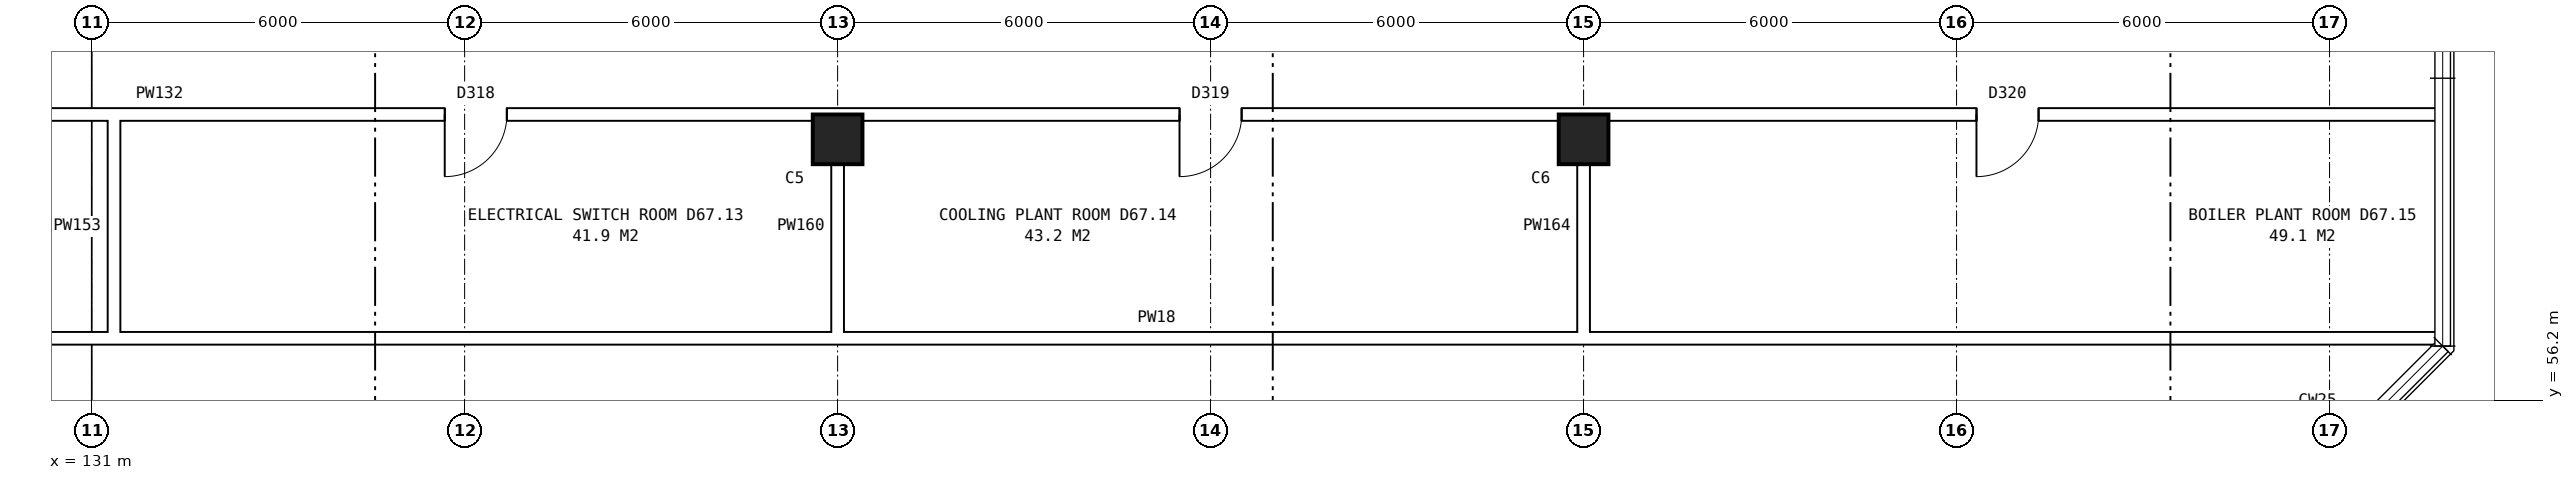
"""IFC4 building model, lengths in metres.
Left out: names, types, materials, properties, quantities, classifications, styles, units other than length and angle.
Written with IfcOpenShell. Run it as: python <this file> out.ifc"""

import sys

from ifc_helpers import new_model, si_unit, direction, frame, frame_2d, origin, origin_2d, place, context, subcontext, project, spatial, rectangle, extrude, element, fill, save


model = new_model("IFC4")
c1 = context("Model", 3, precision=1e-05, world=origin(), true_north=direction((0.0, 1.0)))
c2 = subcontext(c1, "Body", "Model", "MODEL_VIEW")
j1 = project(units=[si_unit("LENGTHUNIT", "METRE"), si_unit("PLANEANGLEUNIT", "RADIAN")], contexts=[c1])
p1 = place(None, origin())
s1 = spatial("IfcSite", under=j1, at=p1, CompositionType="ELEMENT")
p2 = place(p1, origin())
s2 = spatial("IfcBuilding", under=s1, at=p2, CompositionType="ELEMENT")
p3 = place(p2, frame((0.0, 0.0, 236.9)))
s3 = spatial("IfcBuildingStorey", under=s2, at=p3, CompositionType="ELEMENT", Elevation=236.9)
for number, where, z_axis, x_axis in (
    (1, (143.0, 60.4, 0.0), (0.0, 0.0, 1.0), (1.0, 0.0, 0.0)),
    (2, (155.0, 60.4, 0.0), (0.0, 0.0, 1.0), (1.0, 0.0, 0.0)),
):
    element("IfcColumn", number, at=place(p3, frame(where, z_axis=z_axis, x_axis=x_axis)), inside=s3, PredefinedType="COLUMN", context=c2, shape_type="SweptSolid", body=[
        extrude(rectangle(XDim=0.8, YDim=0.8, at=origin_2d()), origin(), (0.0, 0.0, 1.0), 6.7),
    ])
p4 = place(p3, frame((46.66, 57.2, 0.0), z_axis=(0.0, 0.0, 1.0), x_axis=(1.0, 0.0, 0.0)))
e3 = element("IfcWall", 3, at=p4, inside=s3, PredefinedType="PARTITIONING", context=c2, shape_type="SweptSolid", body=[
    extrude(rectangle(XDim=122.1, YDim=0.2, at=frame_2d((61.05, 0.0))), origin(), (0.0, 0.0, 1.0), 6.7),
])
p5 = place(p3, frame((46.66, 60.8, 0.0), z_axis=(0.0, 0.0, 1.0), x_axis=(1.0, 0.0, 0.0)))
e4 = element("IfcWall", 4, at=p5, inside=s3, PredefinedType="PARTITIONING", context=c2, shape_type="SweptSolid", body=[
    extrude(rectangle(XDim=122.1, YDim=0.2, at=frame_2d((61.05, 0.0))), origin(), (0.0, 0.0, 1.0), 6.7),
])
p6 = place(p5, frame((6.12, 0.0, 0.0)))
e5 = element("IfcOpeningElement", 5, at=p6, cuts=e4, PredefinedType="OPENING", context=c2, shape_type="SweptSolid", body=[
    extrude(rectangle(XDim=1.0, YDim=2.1, at=frame_2d((0.5, 1.05))), frame((0.0, 0.11, 0.0), z_axis=(0.0, -1.0, 0.0), x_axis=(1.0, 0.0, 0.0)), (0.0, 0.0, 1.0), 0.22),
])
p7 = place(p5, frame((15.64, 0.0, 0.0)))
e6 = element("IfcOpeningElement", 6, at=p7, cuts=e4, PredefinedType="OPENING", context=c2, shape_type="SweptSolid", body=[
    extrude(rectangle(XDim=1.0, YDim=2.1, at=frame_2d((0.5, 1.05))), frame((0.0, 0.11, 0.0), z_axis=(0.0, -1.0, 0.0), x_axis=(1.0, 0.0, 0.0)), (0.0, 0.0, 1.0), 0.22),
])
p8 = place(p5, frame((25.66, 0.0, 0.0)))
e7 = element("IfcOpeningElement", 7, at=p8, cuts=e4, PredefinedType="OPENING", context=c2, shape_type="SweptSolid", body=[
    extrude(rectangle(XDim=1.0, YDim=2.1, at=frame_2d((0.5, 1.05))), frame((0.0, 0.11, 0.0), z_axis=(0.0, -1.0, 0.0), x_axis=(1.0, 0.0, 0.0)), (0.0, 0.0, 1.0), 0.22),
])
p9 = place(p5, frame((35.535, 0.0, 0.0)))
e8 = element("IfcOpeningElement", 8, at=p9, cuts=e4, PredefinedType="OPENING", context=c2, shape_type="SweptSolid", body=[
    extrude(rectangle(XDim=1.0, YDim=2.1, at=frame_2d((0.5, 1.05))), frame((0.0, 0.11, 0.0), z_axis=(0.0, -1.0, 0.0), x_axis=(1.0, 0.0, 0.0)), (0.0, 0.0, 1.0), 0.22),
])
p10 = place(p5, frame((52.902, 0.0, 0.0)))
e9 = element("IfcOpeningElement", 9, at=p10, cuts=e4, PredefinedType="OPENING", context=c2, shape_type="SweptSolid", body=[
    extrude(rectangle(XDim=1.0, YDim=2.1, at=frame_2d((0.5, 1.05))), frame((0.0, 0.11, 0.0), z_axis=(0.0, -1.0, 0.0), x_axis=(1.0, 0.0, 0.0)), (0.0, 0.0, 1.0), 0.22),
])
p11 = place(p5, frame((73.708, 0.0, 0.0)))
e10 = element("IfcOpeningElement", 10, at=p11, cuts=e4, PredefinedType="OPENING", context=c2, shape_type="SweptSolid", body=[
    extrude(rectangle(XDim=1.0, YDim=2.1, at=frame_2d((0.5, 1.05))), frame((0.0, 0.11, 0.0), z_axis=(0.0, -1.0, 0.0), x_axis=(1.0, 0.0, 0.0)), (0.0, 0.0, 1.0), 0.22),
])
p12 = place(p5, frame((90.02, 0.0, 0.0)))
e11 = element("IfcOpeningElement", 11, at=p12, cuts=e4, PredefinedType="OPENING", context=c2, shape_type="SweptSolid", body=[
    extrude(rectangle(XDim=1.0, YDim=2.1, at=frame_2d((0.5, 1.05))), frame((0.0, 0.11, 0.0), z_axis=(0.0, -1.0, 0.0), x_axis=(1.0, 0.0, 0.0)), (0.0, 0.0, 1.0), 0.22),
])
p13 = place(p5, frame((101.84, 0.0, 0.0)))
e12 = element("IfcOpeningElement", 12, at=p13, cuts=e4, PredefinedType="OPENING", context=c2, shape_type="SweptSolid", body=[
    extrude(rectangle(XDim=1.0, YDim=2.1, at=frame_2d((0.5, 1.05))), frame((0.0, 0.11, 0.0), z_axis=(0.0, -1.0, 0.0), x_axis=(1.0, 0.0, 0.0)), (0.0, 0.0, 1.0), 0.22),
])
p14 = place(p5, frame((114.66, 0.0, 0.0)))
e13 = element("IfcOpeningElement", 13, at=p14, cuts=e4, PredefinedType="OPENING", context=c2, shape_type="SweptSolid", body=[
    extrude(rectangle(XDim=1.0, YDim=2.1, at=frame_2d((0.5, 1.05))), frame((0.0, 0.11, 0.0), z_axis=(0.0, -1.0, 0.0), x_axis=(1.0, 0.0, 0.0)), (0.0, 0.0, 1.0), 0.22),
])
for number, where, z_axis, x_axis in (
    (14, (131.36, 57.1, 0.0), (0.0, 0.0, 1.0), (0.0, 1.0, 0.0)),
    (15, (143.0, 57.1, 0.0), (0.0, 0.0, 1.0), (0.0, 1.0, 0.0)),
    (16, (155.0, 57.1, 0.0), (0.0, 0.0, 1.0), (0.0, 1.0, 0.0)),
):
    element("IfcWall", number, at=place(p3, frame(where, z_axis=z_axis, x_axis=x_axis)), inside=s3, PredefinedType="PARTITIONING", context=c2, shape_type="SweptSolid", body=[
        extrude(rectangle(XDim=3.8, YDim=0.2, at=frame_2d((1.9, 0.0))), origin(), (0.0, 0.0, 1.0), 6.7),
    ])
p15 = place(p12, frame((1.0, 0.0, 0.0), z_axis=(0.0, 0.0, 1.0), x_axis=(-1.0, 0.0, 0.0)))
e17 = element("IfcDoor", 17, at=p15, inside=s3, OperationType="SINGLE_SWING_RIGHT", PredefinedType="DOOR", context=c2, shape_type="SweptSolid", body=[
    extrude(rectangle(XDim=1.0, YDim=2.1, at=frame_2d((0.5, 1.05))), frame((0.0, 0.025, 0.0), z_axis=(0.0, -1.0, 0.0), x_axis=(1.0, 0.0, 0.0)), (0.0, 0.0, 1.0), 0.05),
])
fill(e11, e17)
p16 = place(p13, frame((1.0, 0.0, 0.0), z_axis=(0.0, 0.0, 1.0), x_axis=(-1.0, 0.0, 0.0)))
e18 = element("IfcDoor", 18, at=p16, inside=s3, OperationType="SINGLE_SWING_RIGHT", PredefinedType="DOOR", context=c2, shape_type="SweptSolid", body=[
    extrude(rectangle(XDim=1.0, YDim=2.1, at=frame_2d((0.5, 1.05))), frame((0.0, 0.025, 0.0), z_axis=(0.0, -1.0, 0.0), x_axis=(1.0, 0.0, 0.0)), (0.0, 0.0, 1.0), 0.05),
])
fill(e12, e18)
p17 = place(p14, frame((1.0, 0.0, 0.0), z_axis=(0.0, 0.0, 1.0), x_axis=(-1.0, 0.0, 0.0)))
e19 = element("IfcDoor", 19, at=p17, inside=s3, OperationType="SINGLE_SWING_RIGHT", PredefinedType="DOOR", context=c2, shape_type="SweptSolid", body=[
    extrude(rectangle(XDim=1.0, YDim=2.1, at=frame_2d((0.5, 1.05))), frame((0.0, 0.025, 0.0), z_axis=(0.0, -1.0, 0.0), x_axis=(1.0, 0.0, 0.0)), (0.0, 0.0, 1.0), 0.05),
])
fill(e13, e19)
save(model, sys.argv[1])
